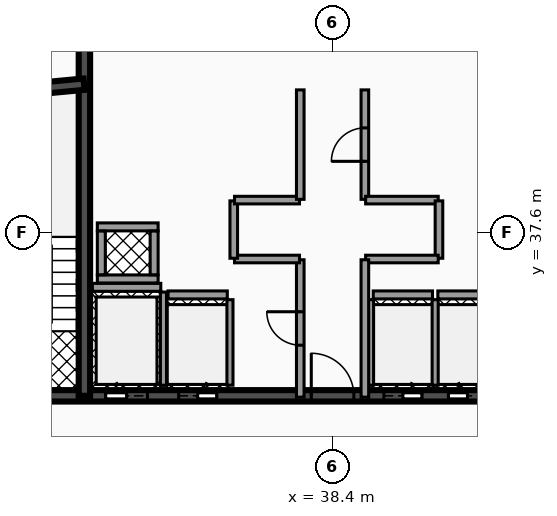
"""IFC4 building model, lengths in metres.
Left out: names, types, materials, properties, quantities, classifications, styles, units other than length and angle.
Written with IfcOpenShell. Run it as: python <this file> out.ifc"""

import sys

from ifc_helpers import new_model, si_unit, direction, frame, frame_2d, origin, place, context, subcontext, project, spatial, rectangle, extrude, element, fill, save


model = new_model("IFC4")
c1 = context("Model", 3, precision=1e-05, world=origin(), true_north=direction((0.0, 1.0)))
c2 = subcontext(c1, "Body", "Model", "MODEL_VIEW")
j1 = project(units=[si_unit("LENGTHUNIT", "METRE"), si_unit("PLANEANGLEUNIT", "RADIAN")], contexts=[c1])
p1 = place(None, origin())
s1 = spatial("IfcSite", under=j1, at=p1, CompositionType="ELEMENT")
p2 = place(p1, origin())
s2 = spatial("IfcBuilding", under=s1, at=p2, CompositionType="ELEMENT")
p3 = place(p2, frame((0.0, 0.0, 222.36)))
s3 = spatial("IfcBuildingStorey", under=s2, at=p3, CompositionType="ELEMENT", Elevation=222.36)
p4 = place(p3, frame((28.5, 33.3, 0.0), z_axis=(0.0, 0.0, 1.0), x_axis=(1.0, 0.0, 0.0)))
e1 = element("IfcWall", 1, at=p4, inside=s3, PredefinedType="SHEAR", context=c2, shape_type="SweptSolid", body=[
    extrude(rectangle(XDim=19.86, YDim=0.3, at=frame_2d((9.93, 0.0))), origin(), (0.0, 0.0, 1.0), 3.18),
])
p5 = place(p4, frame((3.93, 0.0, 0.0)))
e2 = element("IfcOpeningElement", 2, at=p5, cuts=e1, PredefinedType="OPENING", context=c2, shape_type="SweptSolid", body=[
    extrude(rectangle(XDim=1.1, YDim=2.15, at=frame_2d((0.55, 1.075))), frame((0.0, 0.16, 0.0), z_axis=(0.0, -1.0, 0.0), x_axis=(1.0, 0.0, 0.0)), (0.0, 0.0, 1.0), 0.32),
])
p6 = place(p4, frame((14.77, 0.0, 0.0)))
e3 = element("IfcOpeningElement", 3, at=p6, cuts=e1, PredefinedType="OPENING", context=c2, shape_type="SweptSolid", body=[
    extrude(rectangle(XDim=1.1, YDim=2.15, at=frame_2d((0.55, 1.075))), frame((0.0, 0.16, 0.0), z_axis=(0.0, -1.0, 0.0), x_axis=(1.0, 0.0, 0.0)), (0.0, 0.0, 1.0), 0.32),
])
p7 = place(p4, frame((11.25, 0.0, 0.0)))
e4 = element("IfcOpeningElement", 4, at=p7, cuts=e1, PredefinedType="OPENING", context=c2, shape_type="SweptSolid", body=[
    extrude(rectangle(XDim=1.0, YDim=2.1, at=frame_2d((0.5, 1.05))), frame((0.0, 0.16, 0.0), z_axis=(0.0, -1.0, 0.0), x_axis=(1.0, 0.0, 0.0)), (0.0, 0.0, 1.0), 0.32),
])
p8 = place(p4, frame((12.95, 0.0, 0.0)))
e5 = element("IfcOpeningElement", 5, at=p8, cuts=e1, PredefinedType="OPENING", context=c2, shape_type="SweptSolid", body=[
    extrude(rectangle(XDim=1.0, YDim=2.1, at=frame_2d((0.5, 1.05))), frame((0.0, 0.16, 0.0), z_axis=(0.0, -1.0, 0.0), x_axis=(1.0, 0.0, 0.0)), (0.0, 0.0, 1.0), 0.32),
])
p9 = place(p4, frame((5.85, 0.0, 0.0)))
e6 = element("IfcOpeningElement", 6, at=p9, cuts=e1, PredefinedType="OPENING", context=c2, shape_type="SweptSolid", body=[
    extrude(rectangle(XDim=1.0, YDim=2.1, at=frame_2d((0.5, 1.05))), frame((0.0, 0.16, 0.0), z_axis=(0.0, -1.0, 0.0), x_axis=(1.0, 0.0, 0.0)), (0.0, 0.0, 1.0), 0.32),
])
p10 = place(p4, frame((1.21, 0.0, 0.0)))
e7 = element("IfcOpeningElement", 7, at=p10, cuts=e1, PredefinedType="OPENING", context=c2, shape_type="SweptSolid", body=[
    extrude(rectangle(XDim=1.1, YDim=2.2, at=frame_2d((0.55, 1.1))), frame((0.0, 0.16, 0.0), z_axis=(0.0, -1.0, 0.0), x_axis=(1.0, 0.0, 0.0)), (0.0, 0.0, 1.0), 0.32),
])
p11 = place(p4, frame((9.34, 0.0, 0.0)))
e8 = element("IfcOpeningElement", 8, at=p11, cuts=e1, PredefinedType="OPENING", context=c2, shape_type="SweptSolid", body=[
    extrude(rectangle(XDim=1.12, YDim=2.05, at=frame_2d((0.56, 1.025))), frame((0.0, 0.16, 0.0), z_axis=(0.0, -1.0, 0.0), x_axis=(1.0, 0.0, 0.0)), (0.0, 0.0, 1.0), 0.32),
])
p12 = place(p4, frame((17.55, 0.0, 0.0)))
e9 = element("IfcOpeningElement", 9, at=p12, cuts=e1, PredefinedType="OPENING", context=c2, shape_type="SweptSolid", body=[
    extrude(rectangle(XDim=1.1, YDim=2.2, at=frame_2d((0.55, 1.1))), frame((0.0, 0.16, 0.0), z_axis=(0.0, -1.0, 0.0), x_axis=(1.0, 0.0, 0.0)), (0.0, 0.0, 1.0), 0.32),
])
p13 = place(p3, frame((31.87, 33.3, 0.0), z_axis=(0.0, 0.0, 1.0), x_axis=(0.0, 1.0, 0.0)))
e10 = element("IfcWall", 10, at=p13, inside=s3, PredefinedType="SHEAR", context=c2, shape_type="SweptSolid", body=[
    extrude(rectangle(XDim=10.1, YDim=0.3, at=frame_2d((5.05, 0.0))), origin(), (0.0, 0.0, 1.0), 3.18),
])
p14 = place(p3, frame((28.64, 41.2, 0.0), z_axis=(0.0, 0.0, 1.0), x_axis=(0.995687118776, 0.092774789157, 0.0)))
e11 = element("IfcWall", 11, at=p14, inside=s3, PredefinedType="SHEAR", context=c2, shape_type="SweptSolid", body=[
    extrude(rectangle(XDim=3.234, YDim=0.3, at=frame_2d((1.617, 0.0))), origin(), (0.0, 0.0, 1.0), 3.18),
])
p15 = place(p3, frame((32.08, 36.155, 0.0), z_axis=(0.0, 0.0, 1.0), x_axis=(1.0, 0.0, 0.0)))
e12 = element("IfcWall", 12, at=p15, inside=s3, PredefinedType="SOLIDWALL", context=c2, shape_type="SweptSolid", body=[
    extrude(rectangle(XDim=1.8, YDim=0.21, at=frame_2d((0.9, 0.0))), origin(), (0.0, 0.0, 1.0), 3.18),
])
p16 = place(p3, frame((33.95, 33.58, 0.0), z_axis=(0.0, 0.0, 1.0), x_axis=(0.0, 1.0, 0.0)))
e13 = element("IfcWall", 13, at=p16, inside=s3, PredefinedType="SOLIDWALL", context=c2, shape_type="SweptSolid", body=[
    extrude(rectangle(XDim=2.45, YDim=0.16, at=frame_2d((1.225, 0.0))), origin(), (0.0, 0.0, 1.0), 3.18),
])
p17 = place(p3, frame((39.47, 35.955, 0.0), z_axis=(0.0, 0.0, 1.0), x_axis=(1.0, 0.0, 0.0)))
e14 = element("IfcWall", 14, at=p17, inside=s3, PredefinedType="SOLIDWALL", context=c2, shape_type="SweptSolid", body=[
    extrude(rectangle(XDim=1.56, YDim=0.21, at=frame_2d((0.78, 0.0))), origin(), (0.0, 0.0, 1.0), 3.18),
])
for number, where, z_axis, x_axis in (
    (15, (39.4, 33.58, 0.0), (0.0, 0.0, 1.0), (0.0, 1.0, 0.0)),
    (16, (41.1, 33.58, 0.0), (0.0, 0.0, 1.0), (0.0, 1.0, 0.0)),
):
    element("IfcWall", number, at=place(p3, frame(where, z_axis=z_axis, x_axis=x_axis)), inside=s3, PredefinedType="SOLIDWALL", context=c2, shape_type="SweptSolid", body=[
        extrude(rectangle(XDim=2.25, YDim=0.16, at=frame_2d((1.125, 0.0))), origin(), (0.0, 0.0, 1.0), 3.18),
    ])
p18 = place(p3, frame((41.17, 35.955, 0.0), z_axis=(0.0, 0.0, 1.0), x_axis=(1.0, 0.0, 0.0)))
e17 = element("IfcWall", 17, at=p18, inside=s3, PredefinedType="SOLIDWALL", context=c2, shape_type="SweptSolid", body=[
    extrude(rectangle(XDim=1.56, YDim=0.21, at=frame_2d((0.78, 0.0))), origin(), (0.0, 0.0, 1.0), 3.18),
])
p19 = place(p3, frame((34.07, 35.955, 0.0), z_axis=(0.0, 0.0, 1.0), x_axis=(1.0, 0.0, 0.0)))
e18 = element("IfcWall", 18, at=p19, inside=s3, PredefinedType="SOLIDWALL", context=c2, shape_type="SweptSolid", body=[
    extrude(rectangle(XDim=1.56, YDim=0.21, at=frame_2d((0.78, 0.0))), origin(), (0.0, 0.0, 1.0), 3.18),
])
p20 = place(p3, frame((35.7, 33.58, 0.0), z_axis=(0.0, 0.0, 1.0), x_axis=(0.0, 1.0, 0.0)))
e19 = element("IfcWall", 19, at=p20, inside=s3, PredefinedType="SOLIDWALL", context=c2, shape_type="SweptSolid", body=[
    extrude(rectangle(XDim=2.25, YDim=0.16, at=frame_2d((1.125, 0.0))), origin(), (0.0, 0.0, 1.0), 3.18),
])
for number, where, z_axis, x_axis in (
    (20, (32.21, 36.375, 0.0), (0.0, 0.0, 1.0), (1.0, 0.0, 0.0)),
    (21, (32.21, 37.745, 0.0), (0.0, 0.0, 1.0), (1.0, 0.0, 0.0)),
):
    element("IfcWall", number, at=place(p3, frame(where, z_axis=z_axis, x_axis=x_axis)), inside=s3, PredefinedType="SOLIDWALL", context=c2, shape_type="SweptSolid", body=[
        extrude(rectangle(XDim=1.6, YDim=0.21, at=frame_2d((0.8, 0.0))), origin(), (0.0, 0.0, 1.0), 3.18),
    ])
for number, where, z_axis, x_axis in (
    (22, (32.315, 36.485, 0.0), (0.0, 0.0, 1.0), (0.0, 1.0, 0.0)),
    (23, (33.705, 36.485, 0.0), (0.0, 0.0, 1.0), (0.0, 1.0, 0.0)),
):
    element("IfcWall", number, at=place(p3, frame(where, z_axis=z_axis, x_axis=x_axis)), inside=s3, PredefinedType="SOLIDWALL", context=c2, shape_type="SweptSolid", body=[
        extrude(rectangle(XDim=1.15, YDim=0.21, at=frame_2d((0.575, 0.0))), origin(), (0.0, 0.0, 1.0), 3.18),
    ])
p21 = place(p3, frame((37.55, 33.265, 0.0), z_axis=(0.0, 0.0, 1.0), x_axis=(0.0, 1.0, 0.0)))
e24 = element("IfcWall", 24, at=p21, inside=s3, PredefinedType="PARTITIONING", context=c2, shape_type="SweptSolid", body=[
    extrude(rectangle(XDim=3.615, YDim=0.2, at=frame_2d((1.808, 0.0))), origin(), (0.0, 0.0, 1.0), 2.235),
])
p22 = place(p21, frame((1.367, 0.0, 0.0)))
e25 = element("IfcOpeningElement", 25, at=p22, cuts=e24, PredefinedType="OPENING", context=c2, shape_type="SweptSolid", body=[
    extrude(rectangle(XDim=0.88, YDim=2.05, at=frame_2d((0.44, 1.025))), frame((0.0, 0.11, 0.0), z_axis=(0.0, -1.0, 0.0), x_axis=(1.0, 0.0, 0.0)), (0.0, 0.0, 1.0), 0.22),
])
p23 = place(p3, frame((35.82, 36.9, 0.0), z_axis=(0.0, 0.0, 1.0), x_axis=(1.0, 0.0, 0.0)))
e26 = element("IfcWall", 26, at=p23, inside=s3, PredefinedType="PARTITIONING", context=c2, shape_type="SweptSolid", body=[
    extrude(rectangle(XDim=1.71, YDim=0.2, at=frame_2d((0.855, 0.0))), origin(), (0.0, 0.0, 1.0), 2.235),
])
p24 = place(p3, frame((35.8, 36.92, 0.0), z_axis=(0.0, 0.0, 1.0), x_axis=(0.0, 1.0, 0.0)))
e27 = element("IfcWall", 27, at=p24, inside=s3, PredefinedType="PARTITIONING", context=c2, shape_type="SweptSolid", body=[
    extrude(rectangle(XDim=1.51, YDim=0.2, at=frame_2d((0.755, 0.0))), origin(), (0.0, 0.0, 1.0), 2.235),
])
p25 = place(p3, frame((35.82, 38.45, 0.0), z_axis=(0.0, 0.0, 1.0), x_axis=(1.0, 0.0, 0.0)))
e28 = element("IfcWall", 28, at=p25, inside=s3, PredefinedType="PARTITIONING", context=c2, shape_type="SweptSolid", body=[
    extrude(rectangle(XDim=1.71, YDim=0.2, at=frame_2d((0.855, 0.0))), origin(), (0.0, 0.0, 1.0), 2.235),
])
p26 = place(p3, frame((37.55, 38.47, 0.0), z_axis=(0.0, 0.0, 1.0), x_axis=(0.0, 1.0, 0.0)))
e29 = element("IfcWall", 29, at=p26, inside=s3, PredefinedType="PARTITIONING", context=c2, shape_type="SweptSolid", body=[
    extrude(rectangle(XDim=2.88, YDim=0.2, at=frame_2d((1.44, 0.0))), origin(), (0.0, 0.0, 1.0), 2.235),
])
p27 = place(p3, frame((39.25, 38.47, 0.0), z_axis=(0.0, 0.0, 1.0), x_axis=(0.0, 1.0, 0.0)))
e30 = element("IfcWall", 30, at=p27, inside=s3, PredefinedType="PARTITIONING", context=c2, shape_type="SweptSolid", body=[
    extrude(rectangle(XDim=2.88, YDim=0.2, at=frame_2d((1.44, 0.0))), origin(), (0.0, 0.0, 1.0), 2.235),
])
p28 = place(p27, frame((1.0, 0.0, 0.0)))
e31 = element("IfcOpeningElement", 31, at=p28, cuts=e30, PredefinedType="OPENING", context=c2, shape_type="SweptSolid", body=[
    extrude(rectangle(XDim=0.88, YDim=2.05, at=frame_2d((0.44, 1.025))), frame((0.0, 0.11, 0.0), z_axis=(0.0, -1.0, 0.0), x_axis=(1.0, 0.0, 0.0)), (0.0, 0.0, 1.0), 0.22),
])
p29 = place(p3, frame((39.27, 38.45, 0.0), z_axis=(0.0, 0.0, 1.0), x_axis=(1.0, 0.0, 0.0)))
e32 = element("IfcWall", 32, at=p29, inside=s3, PredefinedType="PARTITIONING", context=c2, shape_type="SweptSolid", body=[
    extrude(rectangle(XDim=1.91, YDim=0.2, at=frame_2d((0.955, 0.0))), origin(), (0.0, 0.0, 1.0), 2.235),
])
p30 = place(p3, frame((41.2, 36.92, 0.0), z_axis=(0.0, 0.0, 1.0), x_axis=(0.0, 1.0, 0.0)))
e33 = element("IfcWall", 33, at=p30, inside=s3, PredefinedType="PARTITIONING", context=c2, shape_type="SweptSolid", body=[
    extrude(rectangle(XDim=1.51, YDim=0.2, at=frame_2d((0.755, 0.0))), origin(), (0.0, 0.0, 1.0), 2.235),
])
p31 = place(p3, frame((39.27, 36.9, 0.0), z_axis=(0.0, 0.0, 1.0), x_axis=(1.0, 0.0, 0.0)))
e34 = element("IfcWall", 34, at=p31, inside=s3, PredefinedType="PARTITIONING", context=c2, shape_type="SweptSolid", body=[
    extrude(rectangle(XDim=1.91, YDim=0.2, at=frame_2d((0.955, 0.0))), origin(), (0.0, 0.0, 1.0), 2.235),
])
p32 = place(p3, frame((39.25, 33.265, 0.0), z_axis=(0.0, 0.0, 1.0), x_axis=(0.0, 1.0, 0.0)))
e35 = element("IfcWall", 35, at=p32, inside=s3, PredefinedType="PARTITIONING", context=c2, shape_type="SweptSolid", body=[
    extrude(rectangle(XDim=3.615, YDim=0.2, at=frame_2d((1.808, 0.0))), origin(), (0.0, 0.0, 1.0), 2.235),
])
p33 = place(p5, origin())
e36 = element("IfcDoor", 36, at=p33, inside=s3, OperationType="SLIDING_TO_LEFT", PredefinedType="DOOR", context=c2, shape_type="SweptSolid", body=[
    extrude(rectangle(XDim=1.1, YDim=2.15, at=frame_2d((0.55, 1.075))), frame((0.0, 0.025, 0.0), z_axis=(0.0, -1.0, 0.0), x_axis=(1.0, 0.0, 0.0)), (0.0, 0.0, 1.0), 0.05),
])
fill(e2, e36)
p34 = place(p7, origin())
e37 = element("IfcDoor", 37, at=p34, inside=s3, OperationType="SLIDING_TO_RIGHT", PredefinedType="DOOR", context=c2, shape_type="SweptSolid", body=[
    extrude(rectangle(XDim=1.0, YDim=2.1, at=frame_2d((0.5, 1.05))), frame((0.0, 0.025, 0.0), z_axis=(0.0, -1.0, 0.0), x_axis=(1.0, 0.0, 0.0)), (0.0, 0.0, 1.0), 0.05),
])
fill(e4, e37)
p35 = place(p8, origin())
e38 = element("IfcDoor", 38, at=p35, inside=s3, OperationType="SLIDING_TO_LEFT", PredefinedType="DOOR", context=c2, shape_type="SweptSolid", body=[
    extrude(rectangle(XDim=1.0, YDim=2.1, at=frame_2d((0.5, 1.05))), frame((0.0, 0.025, 0.0), z_axis=(0.0, -1.0, 0.0), x_axis=(1.0, 0.0, 0.0)), (0.0, 0.0, 1.0), 0.05),
])
fill(e5, e38)
p36 = place(p9, origin())
e39 = element("IfcDoor", 39, at=p36, inside=s3, OperationType="SLIDING_TO_RIGHT", PredefinedType="DOOR", context=c2, shape_type="SweptSolid", body=[
    extrude(rectangle(XDim=1.0, YDim=2.1, at=frame_2d((0.5, 1.05))), frame((0.0, 0.025, 0.0), z_axis=(0.0, -1.0, 0.0), x_axis=(1.0, 0.0, 0.0)), (0.0, 0.0, 1.0), 0.05),
])
fill(e6, e39)
p37 = place(p11, origin())
e40 = element("IfcDoor", 40, at=p37, inside=s3, OperationType="SINGLE_SWING_LEFT", PredefinedType="DOOR", context=c2, shape_type="SweptSolid", body=[
    extrude(rectangle(XDim=1.12, YDim=2.05, at=frame_2d((0.56, 1.025))), frame((0.0, 0.025, 0.0), z_axis=(0.0, -1.0, 0.0), x_axis=(1.0, 0.0, 0.0)), (0.0, 0.0, 1.0), 0.05),
])
fill(e8, e40)
p38 = place(p22, origin())
e41 = element("IfcDoor", 41, at=p38, inside=s3, OperationType="SINGLE_SWING_RIGHT", PredefinedType="DOOR", context=c2, shape_type="SweptSolid", body=[
    extrude(rectangle(XDim=0.88, YDim=2.05, at=frame_2d((0.44, 1.025))), frame((0.0, 0.025, 0.0), z_axis=(0.0, -1.0, 0.0), x_axis=(1.0, 0.0, 0.0)), (0.0, 0.0, 1.0), 0.05),
])
fill(e25, e41)
p39 = place(p28, origin())
e42 = element("IfcDoor", 42, at=p39, inside=s3, OperationType="SINGLE_SWING_LEFT", PredefinedType="DOOR", context=c2, shape_type="SweptSolid", body=[
    extrude(rectangle(XDim=0.88, YDim=2.05, at=frame_2d((0.44, 1.025))), frame((0.0, 0.025, 0.0), z_axis=(0.0, -1.0, 0.0), x_axis=(1.0, 0.0, 0.0)), (0.0, 0.0, 1.0), 0.05),
])
fill(e31, e42)
save(model, sys.argv[1])
